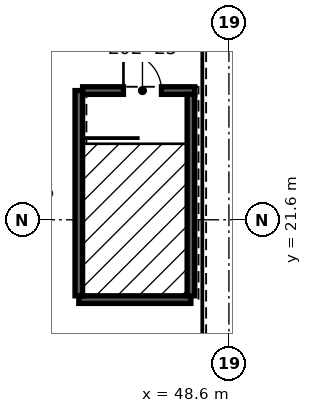
"""IFC4 building model, lengths in metres.
Left out: names, types, materials, properties, quantities, classifications, styles, units other than length and angle.
Written with IfcOpenShell. Run it as: python <this file> out.ifc"""

import sys

from ifc_helpers import new_model, si_unit, direction, frame, frame_2d, origin, place, context, subcontext, project, spatial, rectangle, extrude, element, fill, save


model = new_model("IFC4")
c1 = context("Model", 3, precision=1e-05, world=origin(), true_north=direction((0.0, 1.0)))
c2 = subcontext(c1, "Body", "Model", "MODEL_VIEW")
j1 = project(units=[si_unit("LENGTHUNIT", "METRE"), si_unit("PLANEANGLEUNIT", "RADIAN")], contexts=[c1])
p1 = place(None, origin())
s1 = spatial("IfcSite", under=j1, at=p1, CompositionType="ELEMENT")
p2 = place(p1, origin())
s2 = spatial("IfcBuilding", under=s1, at=p2, CompositionType="ELEMENT")
p3 = place(p2, frame((0.0, 0.0, 9.0)))
s3 = spatial("IfcBuildingStorey", under=s2, at=p3, CompositionType="ELEMENT", Elevation=9.0)
p4 = place(p3, frame((44.65, 19.5, 0.0), z_axis=(0.0, 0.0, 1.0), x_axis=(1.0, 0.0, 0.0)))
e1 = element("IfcWall", 1, at=p4, inside=s3, PredefinedType="SOLIDWALL", context=c2, shape_type="SweptSolid", body=[
    extrude(rectangle(XDim=2.95, YDim=0.2, at=frame_2d((1.475, 0.0))), origin(), (0.0, 0.0, 1.0), 3.0),
])
p5 = place(p3, frame((44.75, 25.0, 0.0), z_axis=(0.0, 0.0, 1.0), x_axis=(1.0, 0.0, 0.0)))
e2 = element("IfcWall", 2, at=p5, inside=s3, PredefinedType="SOLIDWALL", context=c2, shape_type="SweptSolid", body=[
    extrude(rectangle(XDim=2.95, YDim=0.2, at=frame_2d((1.475, 0.0))), origin(), (0.0, 0.0, 1.0), 3.0),
])
p6 = place(p5, frame((1.075, 0.0, 0.0)))
e3 = element("IfcOpeningElement", 3, at=p6, cuts=e2, PredefinedType="OPENING", context=c2, shape_type="SweptSolid", body=[
    extrude(rectangle(XDim=1.0, YDim=2.1, at=frame_2d((0.5, 1.05))), frame((0.0, 0.11, 0.0), z_axis=(0.0, -1.0, 0.0), x_axis=(1.0, 0.0, 0.0)), (0.0, 0.0, 1.0), 0.22),
])
p7 = place(p3, frame((44.65, 19.6, 0.0), z_axis=(0.0, 0.0, 1.0), x_axis=(0.0, 1.0, 0.0)))
e4 = element("IfcWall", 4, at=p7, inside=s3, PredefinedType="SOLIDWALL", context=c2, shape_type="SweptSolid", body=[
    extrude(rectangle(XDim=5.4, YDim=0.2, at=frame_2d((2.7, 0.0))), origin(), (0.0, 0.0, 1.0), 3.0),
])
p8 = place(p3, frame((47.6, 19.6, 0.0), z_axis=(0.0, 0.0, 1.0), x_axis=(0.0, 1.0, 0.0)))
e5 = element("IfcWall", 5, at=p8, inside=s3, PredefinedType="SOLIDWALL", context=c2, shape_type="SweptSolid", body=[
    extrude(rectangle(XDim=5.3, YDim=0.2, at=frame_2d((2.65, 0.0))), origin(), (0.0, 0.0, 1.0), 3.0),
])
p9 = place(p6, origin())
e6 = element("IfcDoor", 6, at=p9, inside=s3, OperationType="SINGLE_SWING_LEFT", PredefinedType="DOOR", context=c2, shape_type="SweptSolid", body=[
    extrude(rectangle(XDim=1.0, YDim=2.1, at=frame_2d((0.5, 1.05))), frame((0.0, 0.025, 0.0), z_axis=(0.0, -1.0, 0.0), x_axis=(1.0, 0.0, 0.0)), (0.0, 0.0, 1.0), 0.05),
])
fill(e3, e6)
save(model, sys.argv[1])
